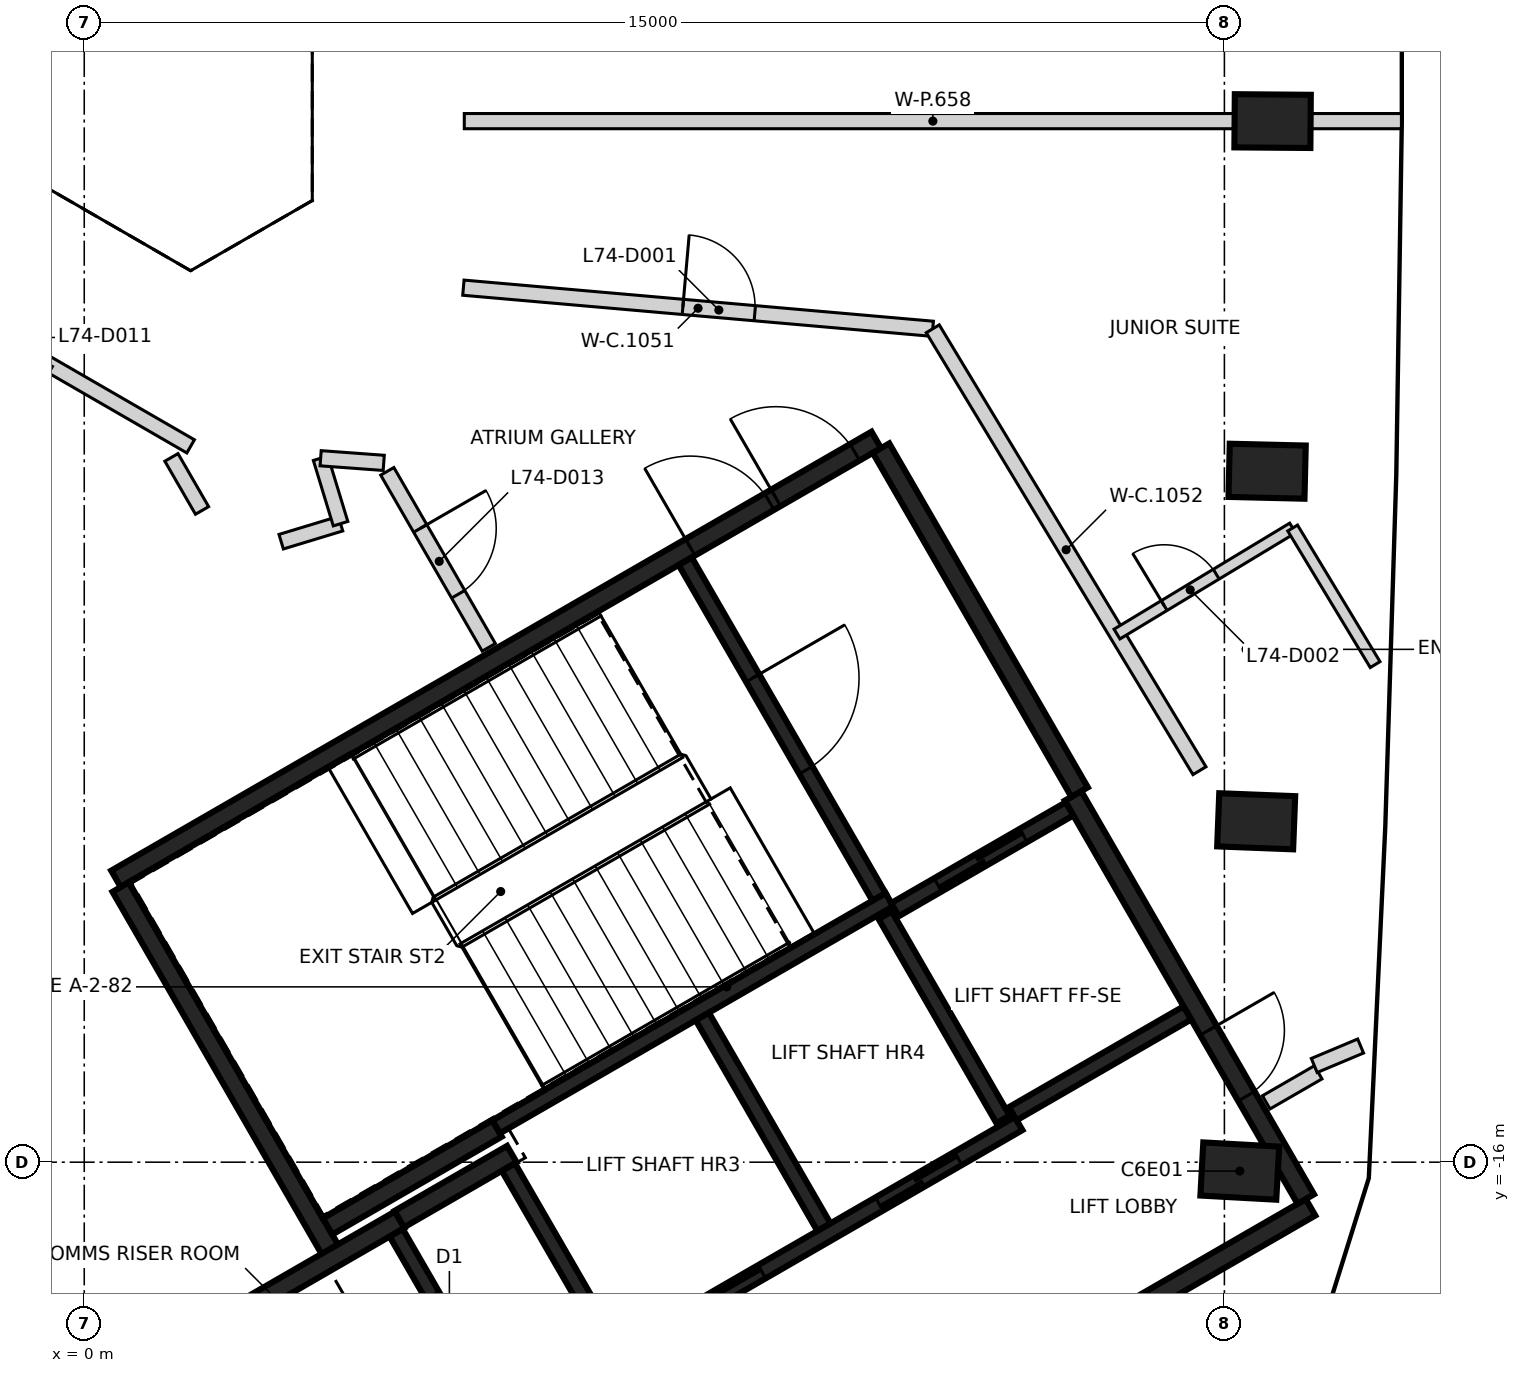
"""IFC4 building model, lengths in metres.
Left out: names, types, materials, properties, quantities, classifications, styles, units other than length and angle.
Written with IfcOpenShell. Run it as: python <this file> out.ifc"""

import sys

from ifc_helpers import new_model, si_unit, direction, frame, frame_2d, origin, origin_2d, place, context, subcontext, project, spatial, rectangle, extrude, element, fill, save


model = new_model("IFC4")
c1 = context("Model", 3, precision=1e-05, world=origin(), true_north=direction((0.0, 1.0)))
c2 = subcontext(c1, "Body", "Model", "MODEL_VIEW")
j1 = project(units=[si_unit("LENGTHUNIT", "METRE"), si_unit("PLANEANGLEUNIT", "RADIAN")], contexts=[c1])
p1 = place(None, origin())
s1 = spatial("IfcSite", under=j1, at=p1, CompositionType="ELEMENT")
p2 = place(p1, origin())
s2 = spatial("IfcBuilding", under=s1, at=p2, CompositionType="ELEMENT")
p3 = place(p2, frame((0.0, 0.0, 294.6)))
s3 = spatial("IfcBuildingStorey", under=s2, at=p3, CompositionType="ELEMENT", Elevation=294.6)
for number, where, z_axis, x_axis in (
    (1, (15.202, -16.117, -0.35), (0.0, 0.0, 1.0), (-0.998, 0.055, 0.0)),
    (2, (15.418, -11.515, -0.35), (0.0, 0.0, 1.0), (-0.999, 0.039, 0.0)),
    (3, (15.562, -6.91, -0.35), (0.0, 0.0, 1.0), (-1.0, 0.024, 0.0)),
    (4, (15.634, -2.303, -0.35), (0.0, 0.0, 1.0), (-1.0, 0.008, 0.0)),
):
    element("IfcColumn", number, at=place(p3, frame(where, z_axis=z_axis, x_axis=x_axis)), inside=s3, PredefinedType="COLUMN", context=c2, shape_type="SweptSolid", body=[
        extrude(rectangle(XDim=1.0, YDim=0.7, at=origin_2d()), origin(), (0.0, 0.0, 1.0), 3.6),
    ])
p4 = place(p3, frame((0.417, -12.273, 0.0), z_axis=(0.0, 0.0, 1.0), x_axis=(0.866021906294, 0.500006057782, 0.0)))
e5 = element("IfcWall", 5, at=p4, inside=s3, PredefinedType="SHEAR", context=c2, shape_type="SweptSolid", body=[
    extrude(rectangle(XDim=11.55, YDim=0.25, at=frame_2d((5.775, 0.0))), origin(), (0.0, 0.0, 1.0), 3.25),
])
p5 = place(p4, frame((10.025, 0.0, 0.0)))
e6 = element("IfcOpeningElement", 6, at=p5, cuts=e5, PredefinedType="OPENING", context=c2, shape_type="SweptSolid", body=[
    extrude(rectangle(XDim=1.2, YDim=2.1, at=frame_2d((0.6, 1.05))), frame((0.0, 0.135, 0.0), z_axis=(0.0, -1.0, 0.0), x_axis=(1.0, 0.0, 0.0)), (0.0, 0.0, 1.0), 0.27),
])
p6 = place(p4, frame((8.725, 0.0, 0.0)))
e7 = element("IfcOpeningElement", 7, at=p6, cuts=e5, PredefinedType="OPENING", context=c2, shape_type="SweptSolid", body=[
    extrude(rectangle(XDim=1.2, YDim=2.1, at=frame_2d((0.6, 1.05))), frame((0.0, 0.135, 0.0), z_axis=(0.0, -1.0, 0.0), x_axis=(1.0, 0.0, 0.0)), (0.0, 0.0, 1.0), 0.27),
])
p7 = place(p3, frame((16.133, -16.594, 0.0), z_axis=(0.0, 0.0, 1.0), x_axis=(-0.866022959057, -0.500004234368, 0.0)))
e8 = element("IfcWall", 8, at=p7, inside=s3, PredefinedType="SHEAR", context=c2, shape_type="SweptSolid", body=[
    extrude(rectangle(XDim=8.75, YDim=0.25, at=frame_2d((4.375, 0.0))), origin(), (0.0, 0.0, 1.0), 3.25),
])
p8 = place(p3, frame((13.008, -11.181, 0.0), z_axis=(0.0, 0.0, 1.0), x_axis=(0.500001955336, -0.866024274868, 0.0)))
e9 = element("IfcWall", 9, at=p8, inside=s3, PredefinedType="SHEAR", context=c2, shape_type="SweptSolid", body=[
    extrude(rectangle(XDim=6.125, YDim=0.25, at=frame_2d((3.062, 0.0))), origin(), (0.0, 0.0, 1.0), 3.25),
])
p9 = place(p8, frame((3.563, 0.0, 0.0)))
e10 = element("IfcOpeningElement", 10, at=p9, cuts=e9, PredefinedType="OPENING", context=c2, shape_type="SweptSolid", body=[
    extrude(rectangle(XDim=1.0, YDim=2.1, at=frame_2d((0.5, 1.05))), frame((0.0, 0.135, 0.0), z_axis=(0.0, -1.0, 0.0), x_axis=(1.0, 0.0, 0.0)), (0.0, 0.0, 1.0), 0.27),
])
p10 = place(p3, frame((3.235, -17.153, 0.0), z_axis=(0.0, 0.0, 1.0), x_axis=(-0.500008851346, 0.866020293397, 0.0)))
e11 = element("IfcWall", 11, at=p10, inside=s3, PredefinedType="SHEAR", context=c2, shape_type="SweptSolid", body=[
    extrude(rectangle(XDim=5.51, YDim=0.25, at=frame_2d((2.755, 0.0))), origin(), (0.0, 0.0, 1.0), 3.25),
])
p11 = place(p3, frame((10.483, -6.606, 0.0), z_axis=(0.0, 0.0, 1.0), x_axis=(0.49999885962, -0.866026062182, 0.0)))
e12 = element("IfcWall", 12, at=p11, inside=s3, PredefinedType="SHEAR", context=c2, shape_type="SweptSolid", body=[
    extrude(rectangle(XDim=5.225, YDim=0.25, at=frame_2d((2.612, 0.0))), origin(), (0.0, 0.0, 1.0), 3.25),
])
p12 = place(p3, frame((1.669, -18.19, 0.0), z_axis=(0.0, 0.0, 1.0), x_axis=(0.866042235819, 0.499970844928, 0.0)))
e13 = element("IfcWall", 13, at=p12, inside=s3, PredefinedType="SHEAR", context=c2, shape_type="SweptSolid", body=[
    extrude(rectangle(XDim=2.865, YDim=0.25, at=frame_2d((1.432, 0.0))), origin(), (0.0, 0.0, 1.0), 3.25),
])
p13 = place(p3, frame((5.431, -15.556, 0.0), z_axis=(0.0, 0.0, 1.0), x_axis=(-0.866022940537, -0.500004266446, 0.0)))
e14 = element("IfcWall", 14, at=p13, inside=s3, PredefinedType="SHEAR", context=c2, shape_type="SweptSolid", body=[
    extrude(rectangle(XDim=2.575, YDim=0.25, at=frame_2d((1.287, 0.0))), origin(), (0.0, 0.0, 1.0), 3.25),
])
p14 = place(p3, frame((4.145, -16.749, 0.0), z_axis=(0.0, 0.0, 1.0), x_axis=(0.866038183914, 0.499977863513, 0.0)))
e15 = element("IfcWall", 15, at=p14, inside=s3, PredefinedType="SHEAR", context=c2, shape_type="SweptSolid", body=[
    extrude(rectangle(XDim=1.71, YDim=0.25, at=frame_2d((0.855, 0.0))), origin(), (0.0, 0.0, 1.0), 3.25),
])
p15 = place(p3, frame((5.419, -15.534, 0.0), z_axis=(0.0, 0.0, 1.0), x_axis=(0.866029065029, 0.499993658486, 0.0)))
e16 = element("IfcWall", 16, at=p15, inside=s3, PredefinedType="SHEAR", context=c2, shape_type="SweptSolid", body=[
    extrude(rectangle(XDim=5.974, YDim=0.2, at=frame_2d((2.987, 0.0))), origin(), (0.0, 0.0, 1.0), 3.25),
])
p16 = place(p3, frame((7.01, -18.542, 0.0), z_axis=(0.0, 0.0, 1.0), x_axis=(0.866030299012, 0.499991521122, 0.0)))
e17 = element("IfcWall", 17, at=p16, inside=s3, PredefinedType="SHEAR", context=c2, shape_type="SweptSolid", body=[
    extrude(rectangle(XDim=6.1, YDim=0.2, at=frame_2d((3.05, 0.0))), origin(), (0.0, 0.0, 1.0), 3.25),
])
p17 = place(p16, frame((1.0, 0.0, 0.0)))
e18 = element("IfcOpeningElement", 18, at=p17, cuts=e17, PredefinedType="OPENING", context=c2, shape_type="SweptSolid", body=[
    extrude(rectangle(XDim=1.2, YDim=2.1, at=frame_2d((0.6, 1.05))), frame((0.0, 0.11, 0.0), z_axis=(0.0, -1.0, 0.0), x_axis=(1.0, 0.0, 0.0)), (0.0, 0.0, 1.0), 0.22),
])
p18 = place(p16, frame((3.982, 0.0, 0.0)))
e19 = element("IfcOpeningElement", 19, at=p18, cuts=e17, PredefinedType="OPENING", context=c2, shape_type="SweptSolid", body=[
    extrude(rectangle(XDim=1.2, YDim=2.1, at=frame_2d((0.6, 1.05))), frame((0.0, 0.11, 0.0), z_axis=(0.0, -1.0, 0.0), x_axis=(1.0, 0.0, 0.0)), (0.0, 0.0, 1.0), 0.22),
])
p19 = place(p3, frame((7.906, -8.094, 0.0), z_axis=(0.0, 0.0, 1.0), x_axis=(0.500027839223, -0.866009330205, 0.0)))
e20 = element("IfcWall", 20, at=p19, inside=s3, PredefinedType="SHEAR", context=c2, shape_type="SweptSolid", body=[
    extrude(rectangle(XDim=5.098, YDim=0.2, at=frame_2d((2.549, 0.0))), origin(), (0.0, 0.0, 1.0), 3.25),
])
p20 = place(p19, frame((1.774, 0.0, 0.0)))
e21 = element("IfcOpeningElement", 21, at=p20, cuts=e20, PredefinedType="OPENING", context=c2, shape_type="SweptSolid", body=[
    extrude(rectangle(XDim=1.4, YDim=2.1, at=frame_2d((0.7, 1.05))), frame((0.0, 0.11, 0.0), z_axis=(0.0, -1.0, 0.0), x_axis=(1.0, 0.0, 0.0)), (0.0, 0.0, 1.0), 0.22),
])
p21 = place(p3, frame((8.132, -14.084, 0.0), z_axis=(0.0, 0.0, 1.0), x_axis=(0.499997778408, -0.866026686418, 0.0)))
e22 = element("IfcWall", 22, at=p21, inside=s3, PredefinedType="SHEAR", context=c2, shape_type="SweptSolid", body=[
    extrude(rectangle(XDim=3.198, YDim=0.2, at=frame_2d((1.599, 0.0))), origin(), (0.0, 0.0, 1.0), 3.25),
])
p22 = place(p3, frame((5.503, -19.352, 0.0), z_axis=(0.0, 0.0, 1.0), x_axis=(-0.499986818241, 0.866033014143, 0.0)))
e23 = element("IfcWall", 23, at=p22, inside=s3, PredefinedType="SHEAR", context=c2, shape_type="SweptSolid", body=[
    extrude(rectangle(XDim=2.798, YDim=0.2, at=frame_2d((1.399, 0.0))), origin(), (0.0, 0.0, 1.0), 3.25),
])
p23 = place(p22, frame((0.949, 0.0, 0.0)))
e24 = element("IfcOpeningElement", 24, at=p23, cuts=e23, PredefinedType="OPENING", context=c2, shape_type="SweptSolid", body=[
    extrude(rectangle(XDim=0.9, YDim=2.1, at=frame_2d((0.45, 1.05))), frame((0.0, 0.11, 0.0), z_axis=(0.0, -1.0, 0.0), x_axis=(1.0, 0.0, 0.0)), (0.0, 0.0, 1.0), 0.22),
])
p24 = place(p3, frame((6.96, -18.455, 0.0), z_axis=(0.0, 0.0, 1.0), x_axis=(-0.499926705758, 0.866067716099, 0.0)))
e25 = element("IfcWall", 25, at=p24, inside=s3, PredefinedType="SHEAR", context=c2, shape_type="SweptSolid", body=[
    extrude(rectangle(XDim=2.759, YDim=0.2, at=frame_2d((1.38, 0.0))), origin(), (0.0, 0.0, 1.0), 3.25),
])
p25 = place(p3, frame((12.088, -15.437, 0.0), z_axis=(0.0, 0.0, 1.0), x_axis=(-0.500026960575, 0.86600983753, 0.0)))
e26 = element("IfcWall", 26, at=p25, inside=s3, PredefinedType="SHEAR", context=c2, shape_type="SweptSolid", body=[
    extrude(rectangle(XDim=3.1, YDim=0.2, at=frame_2d((1.55, 0.0))), origin(), (0.0, 0.0, 1.0), 3.25),
])
p26 = place(p3, frame((10.666, -12.678, 0.0), z_axis=(0.0, 0.0, 1.0), x_axis=(0.866018407898, 0.500012117035, 0.0)))
e27 = element("IfcWall", 27, at=p26, inside=s3, PredefinedType="SHEAR", context=c2, shape_type="SweptSolid", body=[
    extrude(rectangle(XDim=2.651, YDim=0.2, at=frame_2d((1.325, 0.0))), origin(), (0.0, 0.0, 1.0), 3.25),
])
p27 = place(p26, frame((0.652, 0.0, 0.0)))
e28 = element("IfcOpeningElement", 28, at=p27, cuts=e27, PredefinedType="OPENING", context=c2, shape_type="SweptSolid", body=[
    extrude(rectangle(XDim=1.3, YDim=2.1, at=frame_2d((0.65, 1.05))), frame((0.0, 0.11, 0.0), z_axis=(0.0, -1.0, 0.0), x_axis=(1.0, 0.0, 0.0)), (0.0, 0.0, 1.0), 0.22),
])
p28 = place(p3, frame((14.512, -14.037, 0.0), z_axis=(0.0, 0.0, 1.0), x_axis=(-0.866018407898, -0.500012117035, 0.0)))
e29 = element("IfcWall", 29, at=p28, inside=s3, PredefinedType="SHEAR", context=c2, shape_type="SweptSolid", body=[
    extrude(rectangle(XDim=2.651, YDim=0.2, at=frame_2d((1.325, 0.0))), origin(), (0.0, 0.0, 1.0), 3.25),
])
p29 = place(p3, frame((-4.505, -3.171, 0.0), z_axis=(0.0, 0.0, 1.0), x_axis=(0.865849219471, -0.500305036094, 0.0)))
e30 = element("IfcWall", 30, at=p29, inside=s3, PredefinedType="PARTITIONING", context=c2, shape_type="SweptSolid", body=[
    extrude(rectangle(XDim=6.819, YDim=0.2, at=frame_2d((3.41, 0.0))), origin(), (0.0, 0.0, 1.0), 3.25),
])
p30 = place(p29, frame((3.481, 0.0, 0.0)))
e31 = element("IfcOpeningElement", 31, at=p30, cuts=e30, PredefinedType="OPENING", context=c2, shape_type="SweptSolid", body=[
    extrude(rectangle(XDim=0.95, YDim=2.1, at=frame_2d((0.475, 1.05))), frame((0.0, 0.11, 0.0), z_axis=(0.0, -1.0, 0.0), x_axis=(1.0, 0.0, 0.0)), (0.0, 0.0, 1.0), 0.22),
])
p31 = place(p3, frame((1.147, -6.728, 0.0), z_axis=(0.0, 0.0, 1.0), x_axis=(0.500080775649, -0.865978762919, 0.0)))
e32 = element("IfcWall", 32, at=p31, inside=s3, PredefinedType="PARTITIONING", context=c2, shape_type="SweptSolid", body=[
    extrude(rectangle(XDim=0.806, YDim=0.2, at=frame_2d((0.403, 0.0))), origin(), (0.0, 0.0, 1.0), 3.25),
])
p32 = place(p3, frame((2.591, -7.837, 0.0), z_axis=(0.0, 0.0, 1.0), x_axis=(0.956974070788, 0.290173444409, 0.0)))
e33 = element("IfcWall", 33, at=p32, inside=s3, PredefinedType="PARTITIONING", context=c2, shape_type="SweptSolid", body=[
    extrude(rectangle(XDim=0.816, YDim=0.2, at=frame_2d((0.408, 0.0))), origin(), (0.0, 0.0, 1.0), 3.25),
])
p33 = place(p3, frame((3.11, -6.739, 0.0), z_axis=(0.0, 0.0, 1.0), x_axis=(0.291053676179, -0.95670672496, 0.0)))
e34 = element("IfcWall", 34, at=p33, inside=s3, PredefinedType="PARTITIONING", context=c2, shape_type="SweptSolid", body=[
    extrude(rectangle(XDim=0.9, YDim=0.2, at=frame_2d((0.45, 0.0))), origin(), (0.0, 0.0, 1.0), 3.25),
])
p34 = place(p3, frame((3.11, -6.739, 0.0), z_axis=(0.0, 0.0, 1.0), x_axis=(0.997306047238, -0.073352901386, 0.0)))
e35 = element("IfcWall", 35, at=p34, inside=s3, PredefinedType="PARTITIONING", context=c2, shape_type="SweptSolid", body=[
    extrude(rectangle(XDim=0.832, YDim=0.2, at=frame_2d((0.416, 0.0))), origin(), (0.0, 0.0, 1.0), 3.25),
])
p35 = place(p3, frame((3.987, -6.911, 0.0), z_axis=(0.0, 0.0, 1.0), x_axis=(0.499458942258, -0.866337558345, 0.0)))
e36 = element("IfcWall", 36, at=p35, inside=s3, PredefinedType="PARTITIONING", context=c2, shape_type="SweptSolid", body=[
    extrude(rectangle(XDim=2.674, YDim=0.2, at=frame_2d((1.337, 0.0))), origin(), (0.0, 0.0, 1.0), 3.25),
])
p36 = place(p35, frame((0.867, 0.0, 0.0)))
e37 = element("IfcOpeningElement", 37, at=p36, cuts=e36, PredefinedType="OPENING", context=c2, shape_type="SweptSolid", body=[
    extrude(rectangle(XDim=1.0, YDim=2.1, at=frame_2d((0.5, 1.05))), frame((0.0, 0.11, 0.0), z_axis=(0.0, -1.0, 0.0), x_axis=(1.0, 0.0, 0.0)), (0.0, 0.0, 1.0), 0.22),
])
p37 = place(p3, frame((4.988, -4.495, 0.0), z_axis=(0.0, 0.0, 1.0), x_axis=(0.996187344936, -0.087239748904, 0.0)))
e38 = element("IfcWall", 38, at=p37, inside=s3, PredefinedType="PARTITIONING", context=c2, shape_type="SweptSolid", body=[
    extrude(rectangle(XDim=6.199, YDim=0.2, at=frame_2d((3.099, 0.0))), origin(), (0.0, 0.0, 1.0), 3.25),
])
p38 = place(p37, frame((2.899, 0.0, 0.0)))
e39 = element("IfcOpeningElement", 39, at=p38, cuts=e38, PredefinedType="OPENING", context=c2, shape_type="SweptSolid", body=[
    extrude(rectangle(XDim=0.95, YDim=2.1, at=frame_2d((0.475, 1.05))), frame((0.0, 0.11, 0.0), z_axis=(0.0, -1.0, 0.0), x_axis=(1.0, 0.0, 0.0)), (0.0, 0.0, 1.0), 0.22),
])
p39 = place(p3, frame((11.163, -5.036, 0.0), z_axis=(0.0, 0.0, 1.0), x_axis=(0.516730398198, -0.856148173845, 0.0)))
e40 = element("IfcWall", 40, at=p39, inside=s3, PredefinedType="PARTITIONING", context=c2, shape_type="SweptSolid", body=[
    extrude(rectangle(XDim=6.791, YDim=0.2, at=frame_2d((3.396, 0.0))), origin(), (0.0, 0.0, 1.0), 3.25),
])
p40 = place(p3, frame((15.55, -15.213, 0.0), z_axis=(0.0, 0.0, 1.0), x_axis=(0.865989998118, 0.500061319399, 0.0)))
e41 = element("IfcWall", 41, at=p40, inside=s3, PredefinedType="PARTITIONING", context=c2, shape_type="SweptSolid", body=[
    extrude(rectangle(XDim=0.79, YDim=0.2, at=frame_2d((0.395, 0.0))), origin(), (0.0, 0.0, 1.0), 3.25),
])
p41 = place(p3, frame((16.182, -14.728, 0.0), z_axis=(0.0, 0.0, 1.0), x_axis=(0.922058491377, 0.387050563207, 0.0)))
e42 = element("IfcWall", 42, at=p41, inside=s3, PredefinedType="PARTITIONING", context=c2, shape_type="SweptSolid", body=[
    extrude(rectangle(XDim=0.662, YDim=0.2, at=frame_2d((0.331, 0.0))), origin(), (0.0, 0.0, 1.0), 3.25),
])
p42 = place(p3, frame((5.0, -2.304, 0.0), z_axis=(0.0, 0.0, 1.0), x_axis=(1.0, 0.0, 0.0)))
e43 = element("IfcWall", 43, at=p42, inside=s3, PredefinedType="PARTITIONING", context=c2, shape_type="SweptSolid", body=[
    extrude(rectangle(XDim=12.329, YDim=0.2, at=frame_2d((6.165, 0.0))), origin(), (0.0, 0.0, 1.0), 3.25),
])
p43 = place(p3, frame((13.587, -9.052, 0.0), z_axis=(0.0, 0.0, 1.0), x_axis=(0.856117294569, 0.516781557275, 0.0)))
e44 = element("IfcWall", 44, at=p43, inside=s3, PredefinedType="PARTITIONING", context=c2, shape_type="SweptSolid", body=[
    extrude(rectangle(XDim=2.699, YDim=0.15, at=frame_2d((1.35, 0.0))), origin(), (0.0, 0.0, 1.0), 2.35),
])
p44 = place(p43, frame((0.725, 0.0, 0.0)))
e45 = element("IfcOpeningElement", 45, at=p44, cuts=e44, PredefinedType="OPENING", context=c2, shape_type="SweptSolid", body=[
    extrude(rectangle(XDim=0.8, YDim=2.1, at=frame_2d((0.4, 1.05))), frame((0.0, 0.085, 0.0), z_axis=(0.0, -1.0, 0.0), x_axis=(1.0, 0.0, 0.0)), (0.0, 0.0, 1.0), 0.17),
])
p45 = place(p3, frame((15.898, -7.657, 0.0), z_axis=(0.0, 0.0, 1.0), x_axis=(0.516836936411, -0.856083863393, 0.0)))
e46 = element("IfcWall", 46, at=p45, inside=s3, PredefinedType="PARTITIONING", context=c2, shape_type="SweptSolid", body=[
    extrude(rectangle(XDim=2.099, YDim=0.15, at=frame_2d((1.05, 0.0))), origin(), (0.0, 0.0, 1.0), 3.25),
])
p46 = place(p27, origin())
e47 = element("IfcDoor", 47, at=p46, inside=s3, OperationType="SLIDING_TO_LEFT", PredefinedType="DOOR", context=c2, shape_type="SweptSolid", body=[
    extrude(rectangle(XDim=1.3, YDim=2.1, at=frame_2d((0.65, 1.05))), frame((0.0, 0.025, 0.0), z_axis=(0.0, -1.0, 0.0), x_axis=(1.0, 0.0, 0.0)), (0.0, 0.0, 1.0), 0.05),
])
fill(e28, e47)
p47 = place(p17, origin())
e48 = element("IfcDoor", 48, at=p47, inside=s3, OperationType="DOUBLE_DOOR_SLIDING", PredefinedType="DOOR", context=c2, shape_type="SweptSolid", body=[
    extrude(rectangle(XDim=1.2, YDim=2.1, at=frame_2d((0.6, 1.05))), frame((0.0, 0.025, 0.0), z_axis=(0.0, -1.0, 0.0), x_axis=(1.0, 0.0, 0.0)), (0.0, 0.0, 1.0), 0.05),
])
fill(e18, e48)
p48 = place(p18, origin())
e49 = element("IfcDoor", 49, at=p48, inside=s3, OperationType="DOUBLE_DOOR_SLIDING", PredefinedType="DOOR", context=c2, shape_type="SweptSolid", body=[
    extrude(rectangle(XDim=1.2, YDim=2.1, at=frame_2d((0.6, 1.05))), frame((0.0, 0.025, 0.0), z_axis=(0.0, -1.0, 0.0), x_axis=(1.0, 0.0, 0.0)), (0.0, 0.0, 1.0), 0.05),
])
fill(e19, e49)
p49 = place(p9, origin())
e50 = element("IfcDoor", 50, at=p49, inside=s3, OperationType="SINGLE_SWING_LEFT", PredefinedType="DOOR", context=c2, shape_type="SweptSolid", body=[
    extrude(rectangle(XDim=1.0, YDim=2.1, at=frame_2d((0.5, 1.05))), frame((0.0, 0.025, 0.0), z_axis=(0.0, -1.0, 0.0), x_axis=(1.0, 0.0, 0.0)), (0.0, 0.0, 1.0), 0.05),
])
fill(e10, e50)
p50 = place(p5, origin())
e51 = element("IfcDoor", 51, at=p50, inside=s3, OperationType="SINGLE_SWING_LEFT", PredefinedType="DOOR", context=c2, shape_type="SweptSolid", body=[
    extrude(rectangle(XDim=1.2, YDim=2.1, at=frame_2d((0.6, 1.05))), frame((0.0, 0.025, 0.0), z_axis=(0.0, -1.0, 0.0), x_axis=(1.0, 0.0, 0.0)), (0.0, 0.0, 1.0), 0.05),
])
fill(e6, e51)
p51 = place(p6, origin())
e52 = element("IfcDoor", 52, at=p51, inside=s3, OperationType="SINGLE_SWING_RIGHT", PredefinedType="DOOR", context=c2, shape_type="SweptSolid", body=[
    extrude(rectangle(XDim=1.2, YDim=2.1, at=frame_2d((0.6, 1.05))), frame((0.0, 0.025, 0.0), z_axis=(0.0, -1.0, 0.0), x_axis=(1.0, 0.0, 0.0)), (0.0, 0.0, 1.0), 0.05),
])
fill(e7, e52)
p52 = place(p20, origin())
e53 = element("IfcDoor", 53, at=p52, inside=s3, OperationType="SINGLE_SWING_LEFT", PredefinedType="DOOR", context=c2, shape_type="SweptSolid", body=[
    extrude(rectangle(XDim=1.4, YDim=2.1, at=frame_2d((0.7, 1.05))), frame((0.0, 0.025, 0.0), z_axis=(0.0, -1.0, 0.0), x_axis=(1.0, 0.0, 0.0)), (0.0, 0.0, 1.0), 0.05),
])
fill(e21, e53)
p53 = place(p38, frame((0.95, 0.0, 0.0), z_axis=(0.0, 0.0, 1.0), x_axis=(-1.0, 0.0, 0.0)))
e54 = element("IfcDoor", 54, at=p53, inside=s3, OperationType="SINGLE_SWING_LEFT", PredefinedType="DOOR", context=c2, shape_type="SweptSolid", body=[
    extrude(rectangle(XDim=0.95, YDim=2.1, at=frame_2d((0.475, 1.05))), frame((0.0, 0.025, 0.0), z_axis=(0.0, -1.0, 0.0), x_axis=(1.0, 0.0, 0.0)), (0.0, 0.0, 1.0), 0.05),
])
fill(e39, e54)
p54 = place(p44, origin())
e55 = element("IfcDoor", 55, at=p54, inside=s3, OperationType="SINGLE_SWING_LEFT", PredefinedType="DOOR", context=c2, shape_type="SweptSolid", body=[
    extrude(rectangle(XDim=0.8, YDim=2.1, at=frame_2d((0.4, 1.05))), frame((0.0, 0.025, 0.0), z_axis=(0.0, -1.0, 0.0), x_axis=(1.0, 0.0, 0.0)), (0.0, 0.0, 1.0), 0.05),
])
fill(e45, e55)
p55 = place(p36, frame((1.0, 0.0, 0.0), z_axis=(0.0, 0.0, 1.0), x_axis=(-1.0, 0.0, 0.0)))
e56 = element("IfcDoor", 56, at=p55, inside=s3, OperationType="SINGLE_SWING_LEFT", PredefinedType="DOOR", context=c2, shape_type="SweptSolid", body=[
    extrude(rectangle(XDim=1.0, YDim=2.1, at=frame_2d((0.5, 1.05))), frame((0.0, 0.025, 0.0), z_axis=(0.0, -1.0, 0.0), x_axis=(1.0, 0.0, 0.0)), (0.0, 0.0, 1.0), 0.05),
])
fill(e37, e56)
save(model, sys.argv[1])
